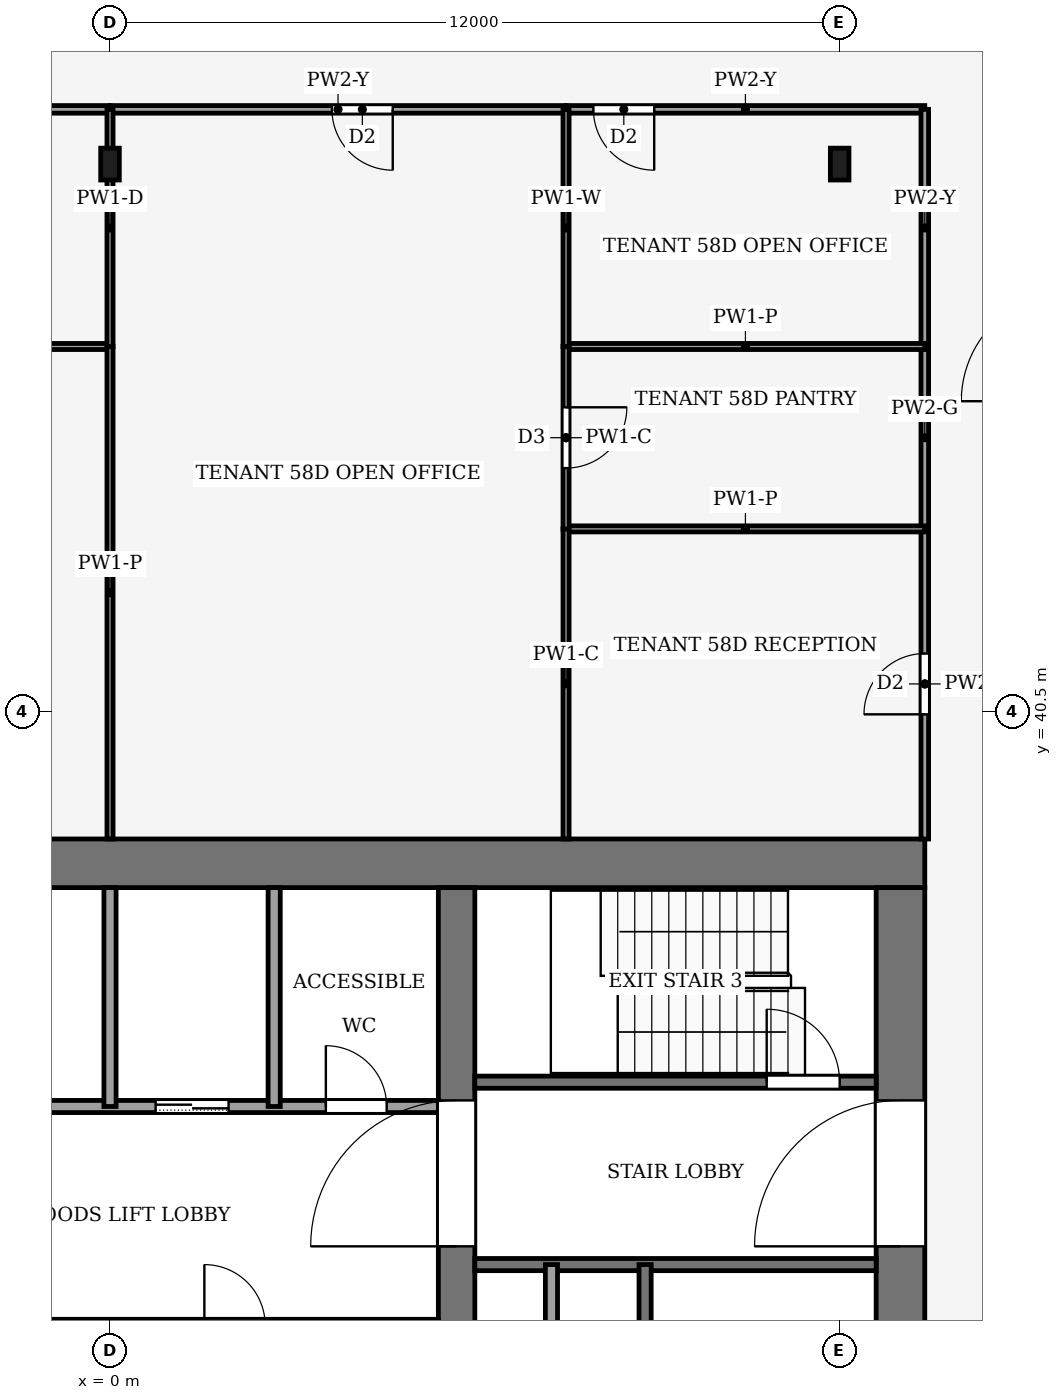
"""IFC4 building model, lengths in metres.
Left out: names, types, materials, properties, quantities, classifications, styles, units other than length and angle.
Written with IfcOpenShell. Run it as: python <this file> out.ifc"""

import sys

from ifc_helpers import new_model, si_unit, direction, frame, frame_2d, origin, origin_2d, place, context, subcontext, project, spatial, rectangle, i_section, extrude, element, fill, save


model = new_model("IFC4")
c1 = context("Model", 3, precision=1e-05, world=origin(), true_north=direction((0.0, 1.0)))
c2 = subcontext(c1, "Body", "Model", "MODEL_VIEW")
j1 = project(units=[si_unit("LENGTHUNIT", "METRE"), si_unit("PLANEANGLEUNIT", "RADIAN")], contexts=[c1])
p1 = place(None, origin())
s1 = spatial("IfcSite", under=j1, at=p1, CompositionType="ELEMENT")
p2 = place(p1, origin())
s2 = spatial("IfcBuilding", under=s1, at=p2, CompositionType="ELEMENT")
p3 = place(p2, frame((0.0, 0.0, 254.0)))
s3 = spatial("IfcBuildingStorey", under=s2, at=p3, CompositionType="ELEMENT", Elevation=254.0)
p4 = place(p3, frame((-13.4, 38.0, -0.13), z_axis=(0.0, 0.0, 1.0), x_axis=(1.0, 0.0, 0.0)))
e1 = element("IfcWall", 1, at=p4, inside=s3, PredefinedType="SHEAR", context=c2, shape_type="SweptSolid", body=[
    extrude(rectangle(XDim=26.8, YDim=0.8, at=frame_2d((13.4, 0.0))), origin(), (0.0, 0.0, 1.0), 4.0),
])
p5 = place(p3, frame((13.0, 18.4, -0.13), z_axis=(0.0, 0.0, 1.0), x_axis=(0.0, 1.0, 0.0)))
e2 = element("IfcWall", 2, at=p5, inside=s3, PredefinedType="SHEAR", context=c2, shape_type="SweptSolid", body=[
    extrude(rectangle(XDim=19.2, YDim=0.8, at=frame_2d((9.6, 0.0))), origin(), (0.0, 0.0, 1.0), 4.0),
])
p6 = place(p5, frame((2.8, 0.0, 0.13)))
e3 = element("IfcOpeningElement", 3, at=p6, cuts=e2, PredefinedType="OPENING", context=c2, shape_type="SweptSolid", body=[
    extrude(rectangle(XDim=2.4, YDim=2.4, at=frame_2d((1.2, 1.2))), frame((0.0, 0.41, 0.0), z_axis=(0.0, -1.0, 0.0), x_axis=(1.0, 0.0, 0.0)), (0.0, 0.0, 1.0), 0.82),
])
p7 = place(p5, frame((13.3, 0.0, 0.13)))
e4 = element("IfcOpeningElement", 4, at=p7, cuts=e2, PredefinedType="OPENING", context=c2, shape_type="SweptSolid", body=[
    extrude(rectangle(XDim=2.4, YDim=2.4, at=frame_2d((1.2, 1.2))), frame((0.0, 0.41, 0.0), z_axis=(0.0, -1.0, 0.0), x_axis=(1.0, 0.0, 0.0)), (0.0, 0.0, 1.0), 0.82),
])
p8 = place(p3, frame((5.7, 18.4, -0.13), z_axis=(0.0, 0.0, 1.0), x_axis=(0.0, 1.0, 0.0)))
e5 = element("IfcWall", 5, at=p8, inside=s3, PredefinedType="SHEAR", context=c2, shape_type="SweptSolid", body=[
    extrude(rectangle(XDim=19.2, YDim=0.6, at=frame_2d((9.6, 0.0))), origin(), (0.0, 0.0, 1.0), 4.0),
])
p9 = place(p8, frame((13.3, 0.0, 0.13)))
e6 = element("IfcOpeningElement", 6, at=p9, cuts=e5, PredefinedType="OPENING", context=c2, shape_type="SweptSolid", body=[
    extrude(rectangle(XDim=2.4, YDim=2.4, at=frame_2d((1.2, 1.2))), frame((0.0, 0.31, 0.0), z_axis=(0.0, -1.0, 0.0), x_axis=(1.0, 0.0, 0.0)), (0.0, 0.0, 1.0), 0.62),
])
for number, where, z_axis, x_axis in (
    (7, (0.0, 49.5, 0.0), (0.0, 0.0, 1.0), (1.0, 0.0, 0.0)),
    (8, (12.0, 49.5, 0.0), (0.0, 0.0, 1.0), (1.0, 0.0, 0.0)),
):
    element("IfcColumn", number, at=place(p3, frame(where, z_axis=z_axis, x_axis=x_axis)), inside=s3, PredefinedType="COLUMN", context=c2, shape_type="SweptSolid", body=[
        extrude(i_section(OverallWidth=0.306, OverallDepth=0.524, WebThickness=0.012, FlangeThickness=0.04, FilletRadius=0.027, at=origin_2d()), origin(), (0.0, 0.0, 1.0), 4.0),
    ])
p10 = place(p3, frame((6.0, 31.4, 0.0), z_axis=(0.0, 0.0, 1.0), x_axis=(1.0, 0.0, 0.0)))
e9 = element("IfcWall", 9, at=p10, inside=s3, PredefinedType="PARTITIONING", context=c2, shape_type="SweptSolid", body=[
    extrude(rectangle(XDim=6.6, YDim=0.2, at=frame_2d((3.3, 0.0))), origin(), (0.0, 0.0, 1.0), 3.87),
])
p11 = place(p3, frame((-5.4, 34.0, 0.0), z_axis=(0.0, 0.0, 1.0), x_axis=(1.0, 0.0, 0.0)))
e10 = element("IfcWall", 10, at=p11, inside=s3, PredefinedType="PARTITIONING", context=c2, shape_type="SweptSolid", body=[
    extrude(rectangle(XDim=10.8, YDim=0.2, at=frame_2d((5.4, 0.0))), origin(), (0.0, 0.0, 1.0), 3.87),
])
p12 = place(p11, frame((6.15, 0.0, 0.0)))
e11 = element("IfcOpeningElement", 11, at=p12, cuts=e10, PredefinedType="OPENING", context=c2, shape_type="SweptSolid", body=[
    extrude(rectangle(XDim=1.2, YDim=2.2, at=frame_2d((0.6, 1.1))), frame((0.0, 0.11, 0.0), z_axis=(0.0, -1.0, 0.0), x_axis=(1.0, 0.0, 0.0)), (0.0, 0.0, 1.0), 0.22),
])
p13 = place(p11, frame((8.95, 0.0, 0.0)))
e12 = element("IfcOpeningElement", 12, at=p13, cuts=e10, PredefinedType="OPENING", context=c2, shape_type="SweptSolid", body=[
    extrude(rectangle(XDim=1.0, YDim=2.1, at=frame_2d((0.5, 1.05))), frame((0.0, 0.11, 0.0), z_axis=(0.0, -1.0, 0.0), x_axis=(1.0, 0.0, 0.0)), (0.0, 0.0, 1.0), 0.22),
])
p14 = place(p3, frame((6.0, 34.4, 0.0), z_axis=(0.0, 0.0, 1.0), x_axis=(1.0, 0.0, 0.0)))
e13 = element("IfcWall", 13, at=p14, inside=s3, PredefinedType="PARTITIONING", context=c2, shape_type="SweptSolid", body=[
    extrude(rectangle(XDim=6.6, YDim=0.2, at=frame_2d((3.3, 0.0))), origin(), (0.0, 0.0, 1.0), 3.87),
])
p15 = place(p14, frame((4.8, 0.0, 0.0)))
e14 = element("IfcOpeningElement", 14, at=p15, cuts=e13, PredefinedType="OPENING", context=c2, shape_type="SweptSolid", body=[
    extrude(rectangle(XDim=1.2, YDim=2.2, at=frame_2d((0.6, 1.1))), frame((0.0, 0.11, 0.0), z_axis=(0.0, -1.0, 0.0), x_axis=(1.0, 0.0, 0.0)), (0.0, 0.0, 1.0), 0.22),
])
for number, where, z_axis, x_axis in (
    (15, (0.0, 34.0, 0.0), (0.0, 0.0, 1.0), (0.0, 1.0, 0.0)),
    (16, (2.7, 34.0, 0.0), (0.0, 0.0, 1.0), (0.0, 1.0, 0.0)),
):
    element("IfcWall", number, at=place(p3, frame(where, z_axis=z_axis, x_axis=x_axis)), inside=s3, PredefinedType="PARTITIONING", context=c2, shape_type="SweptSolid", body=[
        extrude(rectangle(XDim=3.6, YDim=0.2, at=frame_2d((1.8, 0.0))), origin(), (0.0, 0.0, 1.0), 3.87),
    ])
for number, where, z_axis, x_axis in (
    (17, (7.26, 24.0, 0.0), (0.0, 0.0, 1.0), (0.0, 1.0, 0.0)),
    (18, (8.8, 24.0, 0.0), (0.0, 0.0, 1.0), (0.0, 1.0, 0.0)),
):
    element("IfcWall", number, at=place(p3, frame(where, z_axis=z_axis, x_axis=x_axis)), inside=s3, PredefinedType="PARTITIONING", context=c2, shape_type="SweptSolid", body=[
        extrude(rectangle(XDim=7.4, YDim=0.2, at=frame_2d((3.7, 0.0))), origin(), (0.0, 0.0, 1.0), 3.87),
    ])
p16 = place(p3, frame((0.0, 50.4, 0.0), z_axis=(0.0, 0.0, 1.0), x_axis=(-1.0, 0.0, 0.0)))
e19 = element("IfcWall", 19, at=p16, inside=s3, PredefinedType="PARTITIONING", context=c2, shape_type="SweptSolid", body=[
    extrude(rectangle(XDim=7.5, YDim=0.125, at=frame_2d((3.75, 0.0))), origin(), (0.0, 0.0, 1.0), 3.24),
])
p17 = place(p16, frame((3.65, 0.0, 0.0)))
e20 = element("IfcOpeningElement", 20, at=p17, cuts=e19, PredefinedType="OPENING", context=c2, shape_type="SweptSolid", body=[
    extrude(rectangle(XDim=1.0, YDim=2.1, at=frame_2d((0.5, 1.05))), frame((0.0, 0.073, 0.0), z_axis=(0.0, -1.0, 0.0), x_axis=(1.0, 0.0, 0.0)), (0.0, 0.0, 1.0), 0.145),
])
p18 = place(p3, frame((13.4, 38.4, 0.0), z_axis=(0.0, 0.0, 1.0), x_axis=(0.0, 1.0, 0.0)))
e21 = element("IfcWall", 21, at=p18, inside=s3, PredefinedType="PARTITIONING", context=c2, shape_type="SweptSolid", body=[
    extrude(rectangle(XDim=5.1, YDim=0.125, at=frame_2d((2.55, 0.0))), origin(), (0.0, 0.0, 1.0), 3.14),
])
p19 = place(p18, frame((2.05, 0.0, 0.0)))
e22 = element("IfcOpeningElement", 22, at=p19, cuts=e21, PredefinedType="OPENING", context=c2, shape_type="SweptSolid", body=[
    extrude(rectangle(XDim=1.0, YDim=2.1, at=frame_2d((0.5, 1.05))), frame((0.0, 0.073, 0.0), z_axis=(0.0, -1.0, 0.0), x_axis=(1.0, 0.0, 0.0)), (0.0, 0.0, 1.0), 0.145),
])
p20 = place(p3, frame((13.4, 43.5, 0.0), z_axis=(0.0, 0.0, 1.0), x_axis=(0.0, 1.0, 0.0)))
e23 = element("IfcWall", 23, at=p20, inside=s3, PredefinedType="PARTITIONING", context=c2, shape_type="SweptSolid", body=[
    extrude(rectangle(XDim=3.0, YDim=0.125, at=frame_2d((1.5, 0.0))), origin(), (0.0, 0.0, 1.0), 3.87),
])
p21 = place(p3, frame((13.4, 50.4, 0.0), z_axis=(0.0, 0.0, 1.0), x_axis=(-1.0, 0.0, 0.0)))
e24 = element("IfcWall", 24, at=p21, inside=s3, PredefinedType="PARTITIONING", context=c2, shape_type="SweptSolid", body=[
    extrude(rectangle(XDim=5.9, YDim=0.125, at=frame_2d((2.95, 0.0))), origin(), (0.0, 0.0, 1.0), 3.24),
])
p22 = place(p21, frame((4.45, 0.0, 0.0)))
e25 = element("IfcOpeningElement", 25, at=p22, cuts=e24, PredefinedType="OPENING", context=c2, shape_type="SweptSolid", body=[
    extrude(rectangle(XDim=1.0, YDim=2.1, at=frame_2d((0.5, 1.05))), frame((0.0, 0.073, 0.0), z_axis=(0.0, -1.0, 0.0), x_axis=(1.0, 0.0, 0.0)), (0.0, 0.0, 1.0), 0.145),
])
p23 = place(p3, frame((13.4, 46.5, 0.0), z_axis=(0.0, 0.0, 1.0), x_axis=(0.0, 1.0, 0.0)))
e26 = element("IfcWall", 26, at=p23, inside=s3, PredefinedType="PARTITIONING", context=c2, shape_type="SweptSolid", body=[
    extrude(rectangle(XDim=3.9, YDim=0.125, at=frame_2d((1.95, 0.0))), origin(), (0.0, 0.0, 1.0), 3.24),
])
p24 = place(p3, frame((7.5, 50.4, 0.0), z_axis=(0.0, 0.0, 1.0), x_axis=(-1.0, 0.0, 0.0)))
e27 = element("IfcWall", 27, at=p24, inside=s3, PredefinedType="PARTITIONING", context=c2, shape_type="SweptSolid", body=[
    extrude(rectangle(XDim=7.5, YDim=0.125, at=frame_2d((3.75, 0.0))), origin(), (0.0, 0.0, 1.0), 3.24),
])
p25 = place(p24, frame((2.85, 0.0, 0.0)))
e28 = element("IfcOpeningElement", 28, at=p25, cuts=e27, PredefinedType="OPENING", context=c2, shape_type="SweptSolid", body=[
    extrude(rectangle(XDim=1.0, YDim=2.1, at=frame_2d((0.5, 1.05))), frame((0.0, 0.073, 0.0), z_axis=(0.0, -1.0, 0.0), x_axis=(1.0, 0.0, 0.0)), (0.0, 0.0, 1.0), 0.145),
])
p26 = place(p3, frame((0.0, 46.5, 0.0), z_axis=(0.0, 0.0, 1.0), x_axis=(-1.0, 0.0, 0.0)))
e29 = element("IfcWall", 29, at=p26, inside=s3, PredefinedType="PARTITIONING", context=c2, shape_type="SweptSolid", body=[
    extrude(rectangle(XDim=7.5, YDim=0.1, at=frame_2d((3.75, 0.0))), origin(), (0.0, 0.0, 1.0), 3.44),
])
p27 = place(p3, frame((0.0, 38.4, 0.0), z_axis=(0.0, 0.0, 1.0), x_axis=(0.0, 1.0, 0.0)))
e30 = element("IfcWall", 30, at=p27, inside=s3, PredefinedType="PARTITIONING", context=c2, shape_type="SweptSolid", body=[
    extrude(rectangle(XDim=8.104, YDim=0.1, at=frame_2d((4.052, 0.0))), origin(), (0.0, 0.0, 1.0), 3.44),
])
p28 = place(p3, frame((0.0, 46.496, 0.0), z_axis=(0.0, 0.0, 1.0), x_axis=(0.0, 1.0, 0.0)))
e31 = element("IfcWall", 31, at=p28, inside=s3, PredefinedType="PARTITIONING", context=c2, shape_type="SweptSolid", body=[
    extrude(rectangle(XDim=3.904, YDim=0.1, at=frame_2d((1.952, 0.0))), origin(), (0.0, 0.0, 1.0), 3.29),
])
p29 = place(p3, frame((13.4, 43.5, 0.0), z_axis=(0.0, 0.0, 1.0), x_axis=(-1.0, 0.0, 0.0)))
e32 = element("IfcWall", 32, at=p29, inside=s3, PredefinedType="PARTITIONING", context=c2, shape_type="SweptSolid", body=[
    extrude(rectangle(XDim=5.9, YDim=0.1, at=frame_2d((2.95, 0.0))), origin(), (0.0, 0.0, 1.0), 3.44),
])
p30 = place(p3, frame((7.5, 43.504, 0.0), z_axis=(0.0, 0.0, 1.0), x_axis=(0.0, -1.0, 0.0)))
e33 = element("IfcWall", 33, at=p30, inside=s3, PredefinedType="PARTITIONING", context=c2, shape_type="SweptSolid", body=[
    extrude(rectangle(XDim=5.104, YDim=0.1, at=frame_2d((2.552, 0.0))), origin(), (0.0, 0.0, 1.0), 3.87),
])
p31 = place(p3, frame((13.4, 46.5, 0.0), z_axis=(0.0, 0.0, 1.0), x_axis=(-1.0, 0.0, 0.0)))
e34 = element("IfcWall", 34, at=p31, inside=s3, PredefinedType="PARTITIONING", context=c2, shape_type="SweptSolid", body=[
    extrude(rectangle(XDim=5.9, YDim=0.1, at=frame_2d((2.95, 0.0))), origin(), (0.0, 0.0, 1.0), 3.44),
])
p32 = place(p3, frame((7.5, 46.504, 0.0), z_axis=(0.0, 0.0, 1.0), x_axis=(0.0, -1.0, 0.0)))
e35 = element("IfcWall", 35, at=p32, inside=s3, PredefinedType="PARTITIONING", context=c2, shape_type="SweptSolid", body=[
    extrude(rectangle(XDim=3.008, YDim=0.1, at=frame_2d((1.504, 0.0))), origin(), (0.0, 0.0, 1.0), 3.87),
])
p33 = place(p32, frame((1.004, 0.0, 0.0)))
e36 = element("IfcOpeningElement", 36, at=p33, cuts=e35, PredefinedType="OPENING", context=c2, shape_type="SweptSolid", body=[
    extrude(rectangle(XDim=1.0, YDim=2.1, at=frame_2d((0.5, 1.05))), frame((0.0, 0.06, 0.0), z_axis=(0.0, -1.0, 0.0), x_axis=(1.0, 0.0, 0.0)), (0.0, 0.0, 1.0), 0.12),
])
p34 = place(p3, frame((7.5, 50.4, 0.0), z_axis=(0.0, 0.0, 1.0), x_axis=(0.0, -1.0, 0.0)))
e37 = element("IfcWall", 37, at=p34, inside=s3, PredefinedType="PARTITIONING", context=c2, shape_type="SweptSolid", body=[
    extrude(rectangle(XDim=3.904, YDim=0.1, at=frame_2d((1.952, 0.0))), origin(), (0.0, 0.0, 1.0), 3.24),
])
p35 = place(p12, origin())
e38 = element("IfcDoor", 38, at=p35, inside=s3, OperationType="SLIDING_TO_LEFT", PredefinedType="DOOR", context=c2, shape_type="SweptSolid", body=[
    extrude(rectangle(XDim=1.2, YDim=2.2, at=frame_2d((0.6, 1.1))), frame((0.0, 0.025, 0.0), z_axis=(0.0, -1.0, 0.0), x_axis=(1.0, 0.0, 0.0)), (0.0, 0.0, 1.0), 0.05),
])
fill(e11, e38)
p36 = place(p13, origin())
e39 = element("IfcDoor", 39, at=p36, inside=s3, OperationType="SINGLE_SWING_LEFT", PredefinedType="DOOR", context=c2, shape_type="SweptSolid", body=[
    extrude(rectangle(XDim=1.0, YDim=2.1, at=frame_2d((0.5, 1.05))), frame((0.0, 0.025, 0.0), z_axis=(0.0, -1.0, 0.0), x_axis=(1.0, 0.0, 0.0)), (0.0, 0.0, 1.0), 0.05),
])
fill(e12, e39)
p37 = place(p15, origin())
e40 = element("IfcDoor", 40, at=p37, inside=s3, OperationType="SINGLE_SWING_RIGHT", PredefinedType="DOOR", context=c2, shape_type="SweptSolid", body=[
    extrude(rectangle(XDim=1.2, YDim=2.2, at=frame_2d((0.6, 1.1))), frame((0.0, 0.025, 0.0), z_axis=(0.0, -1.0, 0.0), x_axis=(1.0, 0.0, 0.0)), (0.0, 0.0, 1.0), 0.05),
])
fill(e14, e40)
p38 = place(p9, origin())
e41 = element("IfcDoor", 41, at=p38, inside=s3, OperationType="DOUBLE_DOOR_SINGLE_SWING", PredefinedType="DOOR", context=c2, shape_type="SweptSolid", body=[
    extrude(rectangle(XDim=2.4, YDim=2.4, at=frame_2d((1.2, 1.2))), frame((0.0, 0.025, 0.0), z_axis=(0.0, -1.0, 0.0), x_axis=(1.0, 0.0, 0.0)), (0.0, 0.0, 1.0), 0.05),
])
fill(e6, e41)
p39 = place(p7, origin())
e42 = element("IfcDoor", 42, at=p39, inside=s3, OperationType="DOUBLE_DOOR_SINGLE_SWING", PredefinedType="DOOR", context=c2, shape_type="SweptSolid", body=[
    extrude(rectangle(XDim=2.4, YDim=2.4, at=frame_2d((1.2, 1.2))), frame((0.0, 0.025, 0.0), z_axis=(0.0, -1.0, 0.0), x_axis=(1.0, 0.0, 0.0)), (0.0, 0.0, 1.0), 0.05),
])
fill(e4, e42)
p40 = place(p19, origin())
e43 = element("IfcDoor", 43, at=p40, inside=s3, OperationType="SINGLE_SWING_LEFT", PredefinedType="DOOR", context=c2, shape_type="SweptSolid", body=[
    extrude(rectangle(XDim=1.0, YDim=2.1, at=frame_2d((0.5, 1.05))), frame((0.0, 0.025, 0.0), z_axis=(0.0, -1.0, 0.0), x_axis=(1.0, 0.0, 0.0)), (0.0, 0.0, 1.0), 0.05),
])
fill(e22, e43)
p41 = place(p22, origin())
e44 = element("IfcDoor", 44, at=p41, inside=s3, OperationType="SINGLE_SWING_RIGHT", PredefinedType="DOOR", context=c2, shape_type="SweptSolid", body=[
    extrude(rectangle(XDim=1.0, YDim=2.1, at=frame_2d((0.5, 1.05))), frame((0.0, 0.025, 0.0), z_axis=(0.0, -1.0, 0.0), x_axis=(1.0, 0.0, 0.0)), (0.0, 0.0, 1.0), 0.05),
])
fill(e25, e44)
p42 = place(p25, origin())
e45 = element("IfcDoor", 45, at=p42, inside=s3, OperationType="SINGLE_SWING_LEFT", PredefinedType="DOOR", context=c2, shape_type="SweptSolid", body=[
    extrude(rectangle(XDim=1.0, YDim=2.1, at=frame_2d((0.5, 1.05))), frame((0.0, 0.025, 0.0), z_axis=(0.0, -1.0, 0.0), x_axis=(1.0, 0.0, 0.0)), (0.0, 0.0, 1.0), 0.05),
])
fill(e28, e45)
p43 = place(p33, origin())
e46 = element("IfcDoor", 46, at=p43, inside=s3, OperationType="SINGLE_SWING_LEFT", PredefinedType="DOOR", context=c2, shape_type="SweptSolid", body=[
    extrude(rectangle(XDim=1.0, YDim=2.1, at=frame_2d((0.5, 1.05))), frame((0.0, 0.025, 0.0), z_axis=(0.0, -1.0, 0.0), x_axis=(1.0, 0.0, 0.0)), (0.0, 0.0, 1.0), 0.05),
])
fill(e36, e46)
save(model, sys.argv[1])
